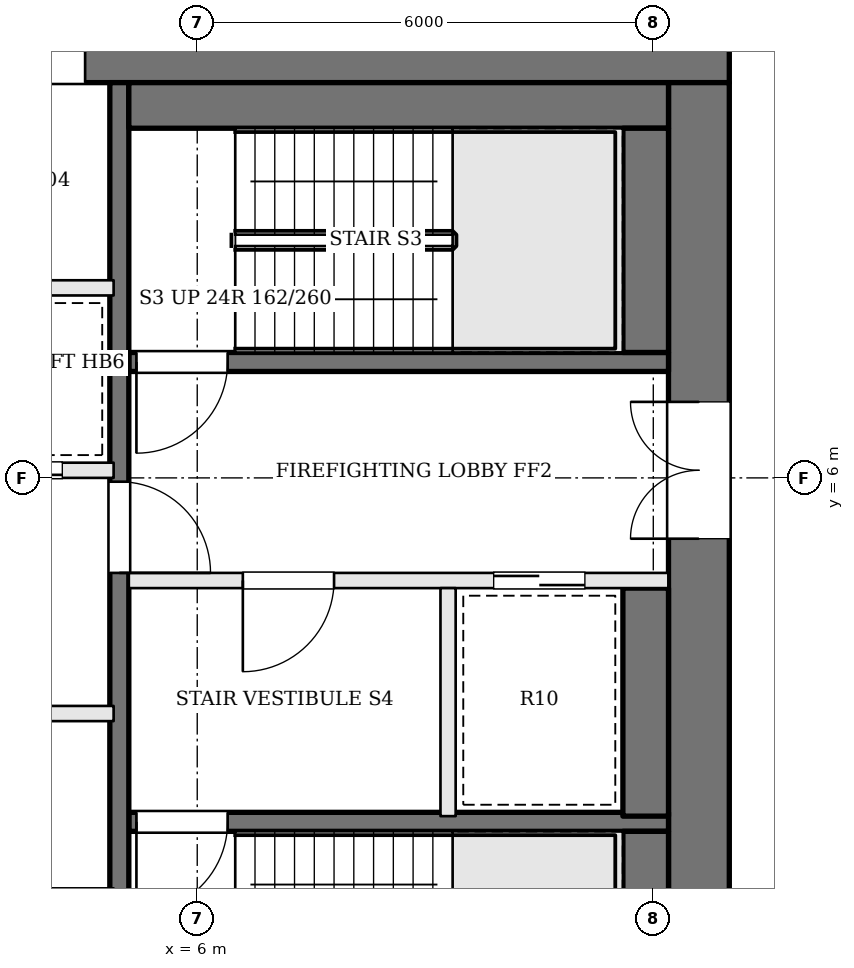
"""IFC4 building model, lengths in metres.
Left out: names, types, materials, properties, quantities, classifications, styles, units other than length and angle.
Written with IfcOpenShell. Run it as: python <this file> out.ifc"""

import sys

from ifc_helpers import new_model, si_unit, direction, frame, frame_2d, origin, place, context, subcontext, project, spatial, rectangle, extrude, element, fill, save


model = new_model("IFC4")
c1 = context("Model", 3, precision=1e-05, world=origin(), true_north=direction((0.0, 1.0)))
c2 = subcontext(c1, "Body", "Model", "MODEL_VIEW")
j1 = project(units=[si_unit("LENGTHUNIT", "METRE"), si_unit("PLANEANGLEUNIT", "RADIAN")], contexts=[c1])
p1 = place(None, origin())
s1 = spatial("IfcSite", under=j1, at=p1, CompositionType="ELEMENT")
p2 = place(p1, origin())
s2 = spatial("IfcBuilding", under=s1, at=p2, CompositionType="ELEMENT")
p3 = place(p2, frame((0.0, 0.0, 225.3)))
s3 = spatial("IfcBuildingStorey", under=s2, at=p3, CompositionType="ELEMENT", Elevation=225.3)
p4 = place(p3, frame((-13.0, 11.6, 0.0), z_axis=(0.0, 0.0, 1.0), x_axis=(1.0, 0.0, 0.0)))
e1 = element("IfcWall", 1, at=p4, inside=s3, PredefinedType="SHEAR", context=c2, shape_type="SweptSolid", body=[
    extrude(rectangle(XDim=26.0, YDim=0.8, at=frame_2d((13.0, 0.0))), origin(), (0.0, 0.0, 1.0), 3.9),
])
p5 = place(p4, frame((9.375, 0.0, 0.0)))
e2 = element("IfcOpeningElement", 2, at=p5, cuts=e1, PredefinedType="OPENING", context=c2, shape_type="SweptSolid", body=[
    extrude(rectangle(XDim=0.7, YDim=2.1, at=frame_2d((0.35, 1.05))), frame((0.0, 0.41, 0.0), z_axis=(0.0, -1.0, 0.0), x_axis=(1.0, 0.0, 0.0)), (0.0, 0.0, 1.0), 0.82),
])
p6 = place(p4, frame((12.075, 0.0, 0.0)))
e3 = element("IfcOpeningElement", 3, at=p6, cuts=e1, PredefinedType="OPENING", context=c2, shape_type="SweptSolid", body=[
    extrude(rectangle(XDim=1.0, YDim=2.1, at=frame_2d((0.5, 1.05))), frame((0.0, 0.41, 0.0), z_axis=(0.0, -1.0, 0.0), x_axis=(1.0, 0.0, 0.0)), (0.0, 0.0, 1.0), 0.82),
])
p7 = place(p4, frame((14.675, 0.0, 0.0)))
e4 = element("IfcOpeningElement", 4, at=p7, cuts=e1, PredefinedType="OPENING", context=c2, shape_type="SweptSolid", body=[
    extrude(rectangle(XDim=0.7, YDim=2.1, at=frame_2d((0.35, 1.05))), frame((0.0, 0.41, 0.0), z_axis=(0.0, -1.0, 0.0), x_axis=(1.0, 0.0, 0.0)), (0.0, 0.0, 1.0), 0.82),
])
p8 = place(p4, frame((16.625, 0.0, 0.0)))
e5 = element("IfcOpeningElement", 5, at=p8, cuts=e1, PredefinedType="OPENING", context=c2, shape_type="SweptSolid", body=[
    extrude(rectangle(XDim=0.9, YDim=2.1, at=frame_2d((0.45, 1.05))), frame((0.0, 0.41, 0.0), z_axis=(0.0, -1.0, 0.0), x_axis=(1.0, 0.0, 0.0)), (0.0, 0.0, 1.0), 0.82),
])
p9 = place(p3, frame((12.6, -2.2, 0.0), z_axis=(0.0, 0.0, 1.0), x_axis=(0.0, 1.0, 0.0)))
e6 = element("IfcWall", 6, at=p9, inside=s3, PredefinedType="SHEAR", context=c2, shape_type="SweptSolid", body=[
    extrude(rectangle(XDim=13.4, YDim=0.8, at=frame_2d((6.7, 0.0))), origin(), (0.0, 0.0, 1.0), 3.9),
])
p10 = place(p9, frame((7.4, 0.0, 0.0)))
e7 = element("IfcOpeningElement", 7, at=p10, cuts=e6, PredefinedType="OPENING", context=c2, shape_type="SweptSolid", body=[
    extrude(rectangle(XDim=1.8, YDim=2.1, at=frame_2d((0.9, 1.05))), frame((0.0, 0.41, 0.0), z_axis=(0.0, -1.0, 0.0), x_axis=(1.0, 0.0, 0.0)), (0.0, 0.0, 1.0), 0.82),
])
p11 = place(p3, frame((12.2, 7.525, 0.0), z_axis=(0.0, 0.0, 1.0), x_axis=(-1.0, 0.0, 0.0)))
e8 = element("IfcWall", 8, at=p11, inside=s3, PredefinedType="SOLIDWALL", context=c2, shape_type="SweptSolid", body=[
    extrude(rectangle(XDim=7.1, YDim=0.25, at=frame_2d((3.55, 0.0))), origin(), (0.0, 0.0, 1.0), 3.7),
])
p12 = place(p11, frame((5.8, 0.0, 0.0)))
e9 = element("IfcOpeningElement", 9, at=p12, cuts=e8, PredefinedType="OPENING", context=c2, shape_type="SweptSolid", body=[
    extrude(rectangle(XDim=1.2, YDim=2.1, at=frame_2d((0.6, 1.05))), frame((0.0, 0.135, 0.0), z_axis=(0.0, -1.0, 0.0), x_axis=(1.0, 0.0, 0.0)), (0.0, 0.0, 1.0), 0.27),
])
p13 = place(p3, frame((12.2, 4.65, 0.0), z_axis=(0.0, 0.0, 1.0), x_axis=(-1.0, 0.0, 0.0)))
e10 = element("IfcWall", 10, at=p13, inside=s3, PredefinedType="SOLIDWALL", context=c2, shape_type="SweptSolid", body=[
    extrude(rectangle(XDim=7.1, YDim=0.2, at=frame_2d((3.55, 0.0))), origin(), (0.0, 0.0, 1.0), 3.7),
])
p14 = place(p13, frame((4.4, 0.0, 0.0)))
e11 = element("IfcOpeningElement", 11, at=p14, cuts=e10, PredefinedType="OPENING", context=c2, shape_type="SweptSolid", body=[
    extrude(rectangle(XDim=1.2, YDim=2.1, at=frame_2d((0.6, 1.05))), frame((0.0, 0.11, 0.0), z_axis=(0.0, -1.0, 0.0), x_axis=(1.0, 0.0, 0.0)), (0.0, 0.0, 1.0), 0.22),
])
p15 = place(p13, frame((1.1, 0.0, 0.0)))
e12 = element("IfcOpeningElement", 12, at=p15, cuts=e10, PredefinedType="OPENING", context=c2, shape_type="SweptSolid", body=[
    extrude(rectangle(XDim=1.2, YDim=2.1, at=frame_2d((0.6, 1.05))), frame((0.0, 0.11, 0.0), z_axis=(0.0, -1.0, 0.0), x_axis=(1.0, 0.0, 0.0)), (0.0, 0.0, 1.0), 0.22),
])
p16 = place(p3, frame((12.2, 1.475, 0.0), z_axis=(0.0, 0.0, 1.0), x_axis=(-1.0, 0.0, 0.0)))
e13 = element("IfcWall", 13, at=p16, inside=s3, PredefinedType="SOLIDWALL", context=c2, shape_type="SweptSolid", body=[
    extrude(rectangle(XDim=7.1, YDim=0.25, at=frame_2d((3.55, 0.0))), origin(), (0.0, 0.0, 1.0), 3.7),
])
p17 = place(p16, frame((5.8, 0.0, 0.0)))
e14 = element("IfcOpeningElement", 14, at=p17, cuts=e13, PredefinedType="OPENING", context=c2, shape_type="SweptSolid", body=[
    extrude(rectangle(XDim=1.2, YDim=2.1, at=frame_2d((0.6, 1.05))), frame((0.0, 0.135, 0.0), z_axis=(0.0, -1.0, 0.0), x_axis=(1.0, 0.0, 0.0)), (0.0, 0.0, 1.0), 0.27),
])
p18 = place(p3, frame((9.3, 4.55, 0.0), z_axis=(0.0, 0.0, 1.0), x_axis=(0.0, -1.0, 0.0)))
e15 = element("IfcWall", 15, at=p18, inside=s3, PredefinedType="SOLIDWALL", context=c2, shape_type="SweptSolid", body=[
    extrude(rectangle(XDim=3.0, YDim=0.2, at=frame_2d((1.5, 0.0))), origin(), (0.0, 0.0, 1.0), 3.7),
])
p19 = place(p3, frame((4.975, 11.2, 0.0), z_axis=(0.0, 0.0, 1.0), x_axis=(0.0, -1.0, 0.0)))
e16 = element("IfcWall", 16, at=p19, inside=s3, PredefinedType="SOLIDWALL", context=c2, shape_type="SweptSolid", body=[
    extrude(rectangle(XDim=13.4, YDim=0.25, at=frame_2d((6.7, 0.0))), origin(), (0.0, 0.0, 1.0), 3.7),
])
p20 = place(p19, frame((5.25, 0.0, 0.0)))
e17 = element("IfcOpeningElement", 17, at=p20, cuts=e16, PredefinedType="OPENING", context=c2, shape_type="SweptSolid", body=[
    extrude(rectangle(XDim=1.2, YDim=2.1, at=frame_2d((0.6, 1.05))), frame((0.0, 0.135, 0.0), z_axis=(0.0, -1.0, 0.0), x_axis=(1.0, 0.0, 0.0)), (0.0, 0.0, 1.0), 0.27),
])
p21 = place(p3, frame((12.2, 10.9, 0.0), z_axis=(0.0, 0.0, 1.0), x_axis=(-1.0, 0.0, 0.0)))
e18 = element("IfcWall", 18, at=p21, inside=s3, PredefinedType="SOLIDWALL", context=c2, shape_type="SweptSolid", body=[
    extrude(rectangle(XDim=7.1, YDim=0.6, at=frame_2d((3.55, 0.0))), origin(), (0.0, 0.0, 1.0), 3.7),
])
p22 = place(p3, frame((11.9, 10.6, 0.0), z_axis=(0.0, 0.0, 1.0), x_axis=(0.0, -1.0, 0.0)))
e19 = element("IfcWall", 19, at=p22, inside=s3, PredefinedType="SOLIDWALL", context=c2, shape_type="SweptSolid", body=[
    extrude(rectangle(XDim=2.95, YDim=0.6, at=frame_2d((1.475, 0.0))), origin(), (0.0, 0.0, 1.0), 3.7),
])
p23 = place(p3, frame((11.9, 4.55, 0.0), z_axis=(0.0, 0.0, 1.0), x_axis=(0.0, -1.0, 0.0)))
e20 = element("IfcWall", 20, at=p23, inside=s3, PredefinedType="SOLIDWALL", context=c2, shape_type="SweptSolid", body=[
    extrude(rectangle(XDim=3.0, YDim=0.6, at=frame_2d((1.5, 0.0))), origin(), (0.0, 0.0, 1.0), 3.7),
])
p24 = place(p3, frame((11.9, 1.35, 0.0), z_axis=(0.0, 0.0, 1.0), x_axis=(0.0, -1.0, 0.0)))
e21 = element("IfcWall", 21, at=p24, inside=s3, PredefinedType="SOLIDWALL", context=c2, shape_type="SweptSolid", body=[
    extrude(rectangle(XDim=2.95, YDim=0.6, at=frame_2d((1.475, 0.0))), origin(), (0.0, 0.0, 1.0), 3.7),
])
p25 = place(p3, frame((-4.9, 2.9, 0.0), z_axis=(0.0, 0.0, 1.0), x_axis=(1.0, 0.0, 0.0)))
e22 = element("IfcWall", 22, at=p25, inside=s3, PredefinedType="SOLIDWALL", context=c2, shape_type="SweptSolid", body=[
    extrude(rectangle(XDim=9.8, YDim=0.2, at=frame_2d((4.9, 0.0))), origin(), (0.0, 0.0, 1.0), 3.7),
])
p26 = place(p25, frame((0.675, 0.0, 0.0)))
e23 = element("IfcOpeningElement", 23, at=p26, cuts=e22, PredefinedType="OPENING", context=c2, shape_type="SweptSolid", body=[
    extrude(rectangle(XDim=1.1, YDim=2.1, at=frame_2d((0.55, 1.05))), frame((0.0, 0.11, 0.0), z_axis=(0.0, -1.0, 0.0), x_axis=(1.0, 0.0, 0.0)), (0.0, 0.0, 1.0), 0.22),
])
p27 = place(p25, frame((2.613, 0.0, 0.0)))
e24 = element("IfcOpeningElement", 24, at=p27, cuts=e22, PredefinedType="OPENING", context=c2, shape_type="SweptSolid", body=[
    extrude(rectangle(XDim=0.9, YDim=2.1, at=frame_2d((0.45, 1.05))), frame((0.0, 0.11, 0.0), z_axis=(0.0, -1.0, 0.0), x_axis=(1.0, 0.0, 0.0)), (0.0, 0.0, 1.0), 0.22),
])
p28 = place(p25, frame((4.35, 0.0, 0.0)))
e25 = element("IfcOpeningElement", 25, at=p28, cuts=e22, PredefinedType="OPENING", context=c2, shape_type="SweptSolid", body=[
    extrude(rectangle(XDim=1.1, YDim=2.1, at=frame_2d((0.55, 1.05))), frame((0.0, 0.11, 0.0), z_axis=(0.0, -1.0, 0.0), x_axis=(1.0, 0.0, 0.0)), (0.0, 0.0, 1.0), 0.22),
])
p29 = place(p25, frame((7.463, 0.0, 0.0)))
e26 = element("IfcOpeningElement", 26, at=p29, cuts=e22, PredefinedType="OPENING", context=c2, shape_type="SweptSolid", body=[
    extrude(rectangle(XDim=1.0, YDim=2.1, at=frame_2d((0.5, 1.05))), frame((0.0, 0.11, 0.0), z_axis=(0.0, -1.0, 0.0), x_axis=(1.0, 0.0, 0.0)), (0.0, 0.0, 1.0), 0.22),
])
p30 = place(p3, frame((-4.9, 6.1, 0.0), z_axis=(0.0, 0.0, 1.0), x_axis=(1.0, 0.0, 0.0)))
e27 = element("IfcWall", 27, at=p30, inside=s3, PredefinedType="SOLIDWALL", context=c2, shape_type="SweptSolid", body=[
    extrude(rectangle(XDim=9.8, YDim=0.2, at=frame_2d((4.9, 0.0))), origin(), (0.0, 0.0, 1.0), 3.7),
])
p31 = place(p30, frame((0.675, 0.0, 0.0)))
e28 = element("IfcOpeningElement", 28, at=p31, cuts=e27, PredefinedType="OPENING", context=c2, shape_type="SweptSolid", body=[
    extrude(rectangle(XDim=1.1, YDim=2.1, at=frame_2d((0.55, 1.05))), frame((0.0, 0.11, 0.0), z_axis=(0.0, -1.0, 0.0), x_axis=(1.0, 0.0, 0.0)), (0.0, 0.0, 1.0), 0.22),
])
p32 = place(p30, frame((3.125, 0.0, 0.0)))
e29 = element("IfcOpeningElement", 29, at=p32, cuts=e27, PredefinedType="OPENING", context=c2, shape_type="SweptSolid", body=[
    extrude(rectangle(XDim=1.1, YDim=2.1, at=frame_2d((0.55, 1.05))), frame((0.0, 0.11, 0.0), z_axis=(0.0, -1.0, 0.0), x_axis=(1.0, 0.0, 0.0)), (0.0, 0.0, 1.0), 0.22),
])
p33 = place(p30, frame((5.575, 0.0, 0.0)))
e30 = element("IfcOpeningElement", 30, at=p33, cuts=e27, PredefinedType="OPENING", context=c2, shape_type="SweptSolid", body=[
    extrude(rectangle(XDim=1.1, YDim=2.1, at=frame_2d((0.55, 1.05))), frame((0.0, 0.11, 0.0), z_axis=(0.0, -1.0, 0.0), x_axis=(1.0, 0.0, 0.0)), (0.0, 0.0, 1.0), 0.22),
])
p34 = place(p30, frame((8.025, 0.0, 0.0)))
e31 = element("IfcOpeningElement", 31, at=p34, cuts=e27, PredefinedType="OPENING", context=c2, shape_type="SweptSolid", body=[
    extrude(rectangle(XDim=1.1, YDim=2.1, at=frame_2d((0.55, 1.05))), frame((0.0, 0.11, 0.0), z_axis=(0.0, -1.0, 0.0), x_axis=(1.0, 0.0, 0.0)), (0.0, 0.0, 1.0), 0.22),
])
p35 = place(p3, frame((-4.9, 8.5, 0.0), z_axis=(0.0, 0.0, 1.0), x_axis=(1.0, 0.0, 0.0)))
e32 = element("IfcWall", 32, at=p35, inside=s3, PredefinedType="SOLIDWALL", context=c2, shape_type="SweptSolid", body=[
    extrude(rectangle(XDim=9.8, YDim=0.2, at=frame_2d((4.9, 0.0))), origin(), (0.0, 0.0, 1.0), 3.7),
])
p36 = place(p10, origin())
e33 = element("IfcDoor", 33, at=p36, inside=s3, OperationType="DOUBLE_DOOR_SINGLE_SWING", PredefinedType="DOOR", context=c2, shape_type="SweptSolid", body=[
    extrude(rectangle(XDim=1.8, YDim=2.1, at=frame_2d((0.9, 1.05))), frame((0.0, 0.025, 0.0), z_axis=(0.0, -1.0, 0.0), x_axis=(1.0, 0.0, 0.0)), (0.0, 0.0, 1.0), 0.05),
])
fill(e7, e33)
p37 = place(p20, origin())
e34 = element("IfcDoor", 34, at=p37, inside=s3, OperationType="SINGLE_SWING_RIGHT", PredefinedType="DOOR", context=c2, shape_type="SweptSolid", body=[
    extrude(rectangle(XDim=1.2, YDim=2.1, at=frame_2d((0.6, 1.05))), frame((0.0, 0.025, 0.0), z_axis=(0.0, -1.0, 0.0), x_axis=(1.0, 0.0, 0.0)), (0.0, 0.0, 1.0), 0.05),
])
fill(e17, e34)
p38 = place(p14, origin())
e35 = element("IfcDoor", 35, at=p38, inside=s3, OperationType="SINGLE_SWING_RIGHT", PredefinedType="DOOR", context=c2, shape_type="SweptSolid", body=[
    extrude(rectangle(XDim=1.2, YDim=2.1, at=frame_2d((0.6, 1.05))), frame((0.0, 0.025, 0.0), z_axis=(0.0, -1.0, 0.0), x_axis=(1.0, 0.0, 0.0)), (0.0, 0.0, 1.0), 0.05),
])
fill(e11, e35)
p39 = place(p12, origin())
e36 = element("IfcDoor", 36, at=p39, inside=s3, OperationType="SINGLE_SWING_RIGHT", PredefinedType="DOOR", context=c2, shape_type="SweptSolid", body=[
    extrude(rectangle(XDim=1.2, YDim=2.1, at=frame_2d((0.6, 1.05))), frame((0.0, 0.025, 0.0), z_axis=(0.0, -1.0, 0.0), x_axis=(1.0, 0.0, 0.0)), (0.0, 0.0, 1.0), 0.05),
])
fill(e9, e36)
p40 = place(p17, origin())
e37 = element("IfcDoor", 37, at=p40, inside=s3, OperationType="SINGLE_SWING_RIGHT", PredefinedType="DOOR", context=c2, shape_type="SweptSolid", body=[
    extrude(rectangle(XDim=1.2, YDim=2.1, at=frame_2d((0.6, 1.05))), frame((0.0, 0.025, 0.0), z_axis=(0.0, -1.0, 0.0), x_axis=(1.0, 0.0, 0.0)), (0.0, 0.0, 1.0), 0.05),
])
fill(e14, e37)
p41 = place(p15, origin())
e38 = element("IfcDoor", 38, at=p41, inside=s3, OperationType="SLIDING_TO_RIGHT", PredefinedType="DOOR", context=c2, shape_type="SweptSolid", body=[
    extrude(rectangle(XDim=1.2, YDim=2.1, at=frame_2d((0.6, 1.05))), frame((0.0, 0.025, 0.0), z_axis=(0.0, -1.0, 0.0), x_axis=(1.0, 0.0, 0.0)), (0.0, 0.0, 1.0), 0.05),
])
fill(e12, e38)
p42 = place(p34, origin())
e39 = element("IfcDoor", 39, at=p42, inside=s3, OperationType="SLIDING_TO_LEFT", PredefinedType="DOOR", context=c2, shape_type="SweptSolid", body=[
    extrude(rectangle(XDim=1.1, YDim=2.1, at=frame_2d((0.55, 1.05))), frame((0.0, 0.025, 0.0), z_axis=(0.0, -1.0, 0.0), x_axis=(1.0, 0.0, 0.0)), (0.0, 0.0, 1.0), 0.05),
])
fill(e31, e39)
p43 = place(p8, origin())
e40 = element("IfcDoor", 40, at=p43, inside=s3, OperationType="SINGLE_SWING_RIGHT", PredefinedType="DOOR", context=c2, shape_type="SweptSolid", body=[
    extrude(rectangle(XDim=0.9, YDim=2.1, at=frame_2d((0.45, 1.05))), frame((0.0, 0.025, 0.0), z_axis=(0.0, -1.0, 0.0), x_axis=(1.0, 0.0, 0.0)), (0.0, 0.0, 1.0), 0.05),
])
fill(e5, e40)
save(model, sys.argv[1])
